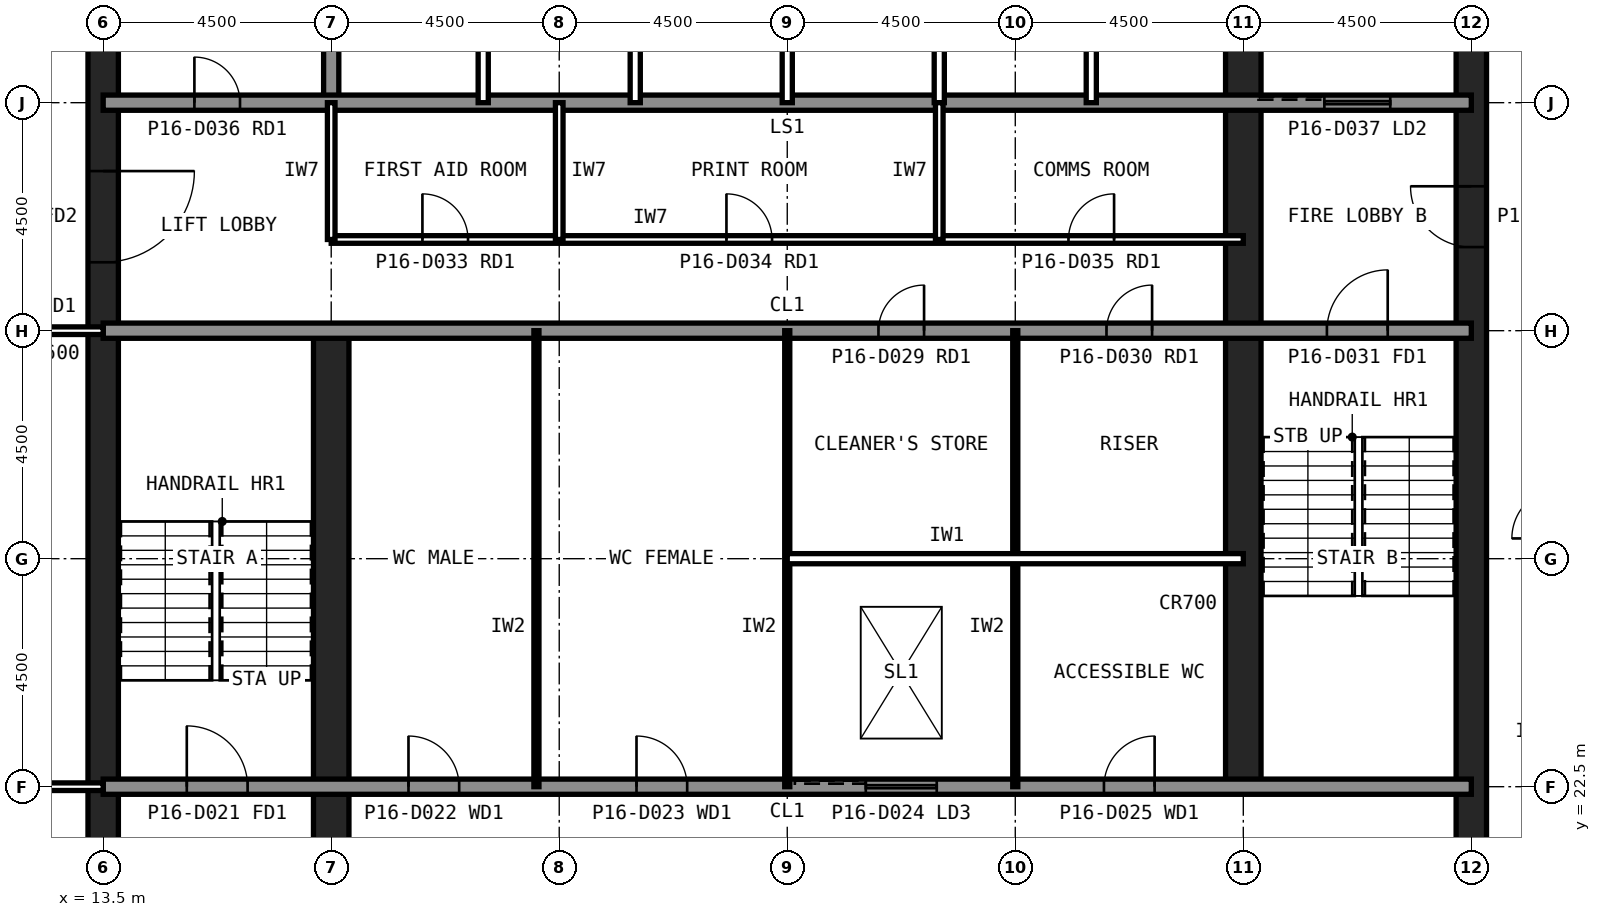
"""IFC4 building model, lengths in metres.
Left out: names, types, materials, properties, quantities, classifications, styles, units other than length and angle.
Written with IfcOpenShell. Run it as: python <this file> out.ifc"""

import sys

from ifc_helpers import new_model, si_unit, direction, frame, frame_2d, origin, place, context, subcontext, project, spatial, rectangle, extrude, element, fill, save


model = new_model("IFC4")
c1 = context("Model", 3, precision=1e-05, world=origin(), true_north=direction((0.0, 1.0)))
c2 = subcontext(c1, "Body", "Model", "MODEL_VIEW")
j1 = project(units=[si_unit("LENGTHUNIT", "METRE"), si_unit("PLANEANGLEUNIT", "RADIAN")], contexts=[c1])
p1 = place(None, origin())
s1 = spatial("IfcSite", under=j1, at=p1, CompositionType="ELEMENT")
p2 = place(p1, origin())
s2 = spatial("IfcBuilding", under=s1, at=p2, CompositionType="ELEMENT")
p3 = place(p2, frame((0.0, 0.0, 71.0)))
s3 = spatial("IfcBuildingStorey", under=s2, at=p3, CompositionType="ELEMENT", Elevation=71.0)
p4 = place(p3, frame((40.5, 13.5, 0.0), z_axis=(0.0, 0.0, 1.0), x_axis=(0.0, 1.0, 0.0)))
e1 = element("IfcWall", 1, at=p4, inside=s3, PredefinedType="SHEAR", context=c2, shape_type="SweptSolid", body=[
    extrude(rectangle(XDim=27.0, YDim=0.6, at=frame_2d((13.5, 0.0))), origin(), (0.0, 0.0, 1.0), 4.2),
])
p5 = place(p4, frame((5.85, 0.0, 0.0)))
e2 = element("IfcOpeningElement", 2, at=p5, cuts=e1, PredefinedType="OPENING", context=c2, shape_type="SweptSolid", body=[
    extrude(rectangle(XDim=1.8, YDim=2.1, at=frame_2d((0.9, 1.05))), frame((0.0, 0.31, 0.0), z_axis=(0.0, -1.0, 0.0), x_axis=(1.0, 0.0, 0.0)), (0.0, 0.0, 1.0), 0.62),
])
p6 = place(p4, frame((19.65, 0.0, 0.0)))
e3 = element("IfcOpeningElement", 3, at=p6, cuts=e1, PredefinedType="OPENING", context=c2, shape_type="SweptSolid", body=[
    extrude(rectangle(XDim=1.2, YDim=2.1, at=frame_2d((0.6, 1.05))), frame((0.0, 0.31, 0.0), z_axis=(0.0, -1.0, 0.0), x_axis=(1.0, 0.0, 0.0)), (0.0, 0.0, 1.0), 0.62),
])
p7 = place(p3, frame((13.5, 40.5, 0.0), z_axis=(0.0, 0.0, 1.0), x_axis=(0.0, -1.0, 0.0)))
e4 = element("IfcWall", 4, at=p7, inside=s3, PredefinedType="SHEAR", context=c2, shape_type="SweptSolid", body=[
    extrude(rectangle(XDim=27.0, YDim=0.6, at=frame_2d((13.5, 0.0))), origin(), (0.0, 0.0, 1.0), 4.2),
])
p8 = place(p7, frame((19.65, 0.0, 0.0)))
e5 = element("IfcOpeningElement", 5, at=p8, cuts=e4, PredefinedType="OPENING", context=c2, shape_type="SweptSolid", body=[
    extrude(rectangle(XDim=1.2, YDim=2.1, at=frame_2d((0.6, 1.05))), frame((0.0, 0.31, 0.0), z_axis=(0.0, -1.0, 0.0), x_axis=(1.0, 0.0, 0.0)), (0.0, 0.0, 1.0), 0.62),
])
p9 = place(p7, frame((5.85, 0.0, 0.0)))
e6 = element("IfcOpeningElement", 6, at=p9, cuts=e4, PredefinedType="OPENING", context=c2, shape_type="SweptSolid", body=[
    extrude(rectangle(XDim=1.8, YDim=2.1, at=frame_2d((0.9, 1.05))), frame((0.0, 0.31, 0.0), z_axis=(0.0, -1.0, 0.0), x_axis=(1.0, 0.0, 0.0)), (0.0, 0.0, 1.0), 0.62),
])
p10 = place(p3, frame((18.0, 13.5, 0.0), z_axis=(0.0, 0.0, 1.0), x_axis=(0.0, 1.0, 0.0)))
e7 = element("IfcWall", 7, at=p10, inside=s3, PredefinedType="SHEAR", context=c2, shape_type="SweptSolid", body=[
    extrude(rectangle(XDim=18.0, YDim=0.7, at=frame_2d((9.0, 0.0))), origin(), (0.0, 0.0, 1.0), 4.2),
])
p11 = place(p3, frame((18.0, 36.0, 0.0), z_axis=(0.0, 0.0, 1.0), x_axis=(0.0, 1.0, 0.0)))
e8 = element("IfcWall", 8, at=p11, inside=s3, PredefinedType="SOLIDWALL", context=c2, shape_type="SweptSolid", body=[
    extrude(rectangle(XDim=4.5, YDim=0.3, at=frame_2d((2.25, 0.0))), origin(), (0.0, 0.0, 1.0), 4.04),
])
p12 = place(p3, frame((36.0, 22.5, 0.0), z_axis=(0.0, 0.0, 1.0), x_axis=(0.0, 1.0, 0.0)))
e9 = element("IfcWall", 9, at=p12, inside=s3, PredefinedType="SHEAR", context=c2, shape_type="SweptSolid", body=[
    extrude(rectangle(XDim=18.0, YDim=0.7, at=frame_2d((9.0, 0.0))), origin(), (0.0, 0.0, 1.0), 4.2),
])
p13 = place(p3, frame((13.5, 36.0, 0.0), z_axis=(0.0, 0.0, 1.0), x_axis=(1.0, 0.0, 0.0)))
e10 = element("IfcWall", 10, at=p13, inside=s3, PredefinedType="SOLIDWALL", context=c2, shape_type="SweptSolid", body=[
    extrude(rectangle(XDim=27.0, YDim=0.3, at=frame_2d((13.5, 0.0))), origin(), (0.0, 0.0, 1.0), 4.04),
])
p14 = place(p13, frame((1.8, 0.0, 0.0)))
e11 = element("IfcOpeningElement", 11, at=p14, cuts=e10, PredefinedType="OPENING", context=c2, shape_type="SweptSolid", body=[
    extrude(rectangle(XDim=0.9, YDim=2.1, at=frame_2d((0.45, 1.05))), frame((0.0, 0.16, 0.0), z_axis=(0.0, -1.0, 0.0), x_axis=(1.0, 0.0, 0.0)), (0.0, 0.0, 1.0), 0.32),
])
p15 = place(p13, frame((24.1, 0.0, 0.0)))
e12 = element("IfcOpeningElement", 12, at=p15, cuts=e10, PredefinedType="OPENING", context=c2, shape_type="SweptSolid", body=[
    extrude(rectangle(XDim=1.3, YDim=2.2, at=frame_2d((0.65, 1.1))), frame((0.0, 0.16, 0.0), z_axis=(0.0, -1.0, 0.0), x_axis=(1.0, 0.0, 0.0)), (0.0, 0.0, 1.0), 0.32),
])
p16 = place(p3, frame((13.5, 22.5, 0.0), z_axis=(0.0, 0.0, 1.0), x_axis=(1.0, 0.0, 0.0)))
e13 = element("IfcWall", 13, at=p16, inside=s3, PredefinedType="SOLIDWALL", context=c2, shape_type="SweptSolid", body=[
    extrude(rectangle(XDim=27.0, YDim=0.3, at=frame_2d((13.5, 0.0))), origin(), (0.0, 0.0, 1.0), 4.04),
])
p17 = place(p16, frame((1.65, 0.0, 0.0)))
e14 = element("IfcOpeningElement", 14, at=p17, cuts=e13, PredefinedType="OPENING", context=c2, shape_type="SweptSolid", body=[
    extrude(rectangle(XDim=1.2, YDim=2.1, at=frame_2d((0.6, 1.05))), frame((0.0, 0.16, 0.0), z_axis=(0.0, -1.0, 0.0), x_axis=(1.0, 0.0, 0.0)), (0.0, 0.0, 1.0), 0.32),
])
p18 = place(p16, frame((6.025, 0.0, 0.0)))
e15 = element("IfcOpeningElement", 15, at=p18, cuts=e13, PredefinedType="OPENING", context=c2, shape_type="SweptSolid", body=[
    extrude(rectangle(XDim=1.0, YDim=2.1, at=frame_2d((0.5, 1.05))), frame((0.0, 0.16, 0.0), z_axis=(0.0, -1.0, 0.0), x_axis=(1.0, 0.0, 0.0)), (0.0, 0.0, 1.0), 0.32),
])
p19 = place(p16, frame((10.525, 0.0, 0.0)))
e16 = element("IfcOpeningElement", 16, at=p19, cuts=e13, PredefinedType="OPENING", context=c2, shape_type="SweptSolid", body=[
    extrude(rectangle(XDim=1.0, YDim=2.1, at=frame_2d((0.5, 1.05))), frame((0.0, 0.16, 0.0), z_axis=(0.0, -1.0, 0.0), x_axis=(1.0, 0.0, 0.0)), (0.0, 0.0, 1.0), 0.32),
])
p20 = place(p16, frame((19.75, 0.0, 0.0)))
e17 = element("IfcOpeningElement", 17, at=p20, cuts=e13, PredefinedType="OPENING", context=c2, shape_type="SweptSolid", body=[
    extrude(rectangle(XDim=1.0, YDim=2.1, at=frame_2d((0.5, 1.05))), frame((0.0, 0.16, 0.0), z_axis=(0.0, -1.0, 0.0), x_axis=(1.0, 0.0, 0.0)), (0.0, 0.0, 1.0), 0.32),
])
p21 = place(p16, frame((15.05, 0.0, 0.0)))
e18 = element("IfcOpeningElement", 18, at=p21, cuts=e13, PredefinedType="OPENING", context=c2, shape_type="SweptSolid", body=[
    extrude(rectangle(XDim=1.4, YDim=2.4, at=frame_2d((0.7, 1.2))), frame((0.0, 0.16, 0.0), z_axis=(0.0, -1.0, 0.0), x_axis=(1.0, 0.0, 0.0)), (0.0, 0.0, 1.0), 0.32),
])
p22 = place(p3, frame((13.5, 31.5, 0.0), z_axis=(0.0, 0.0, 1.0), x_axis=(1.0, 0.0, 0.0)))
e19 = element("IfcWall", 19, at=p22, inside=s3, PredefinedType="SOLIDWALL", context=c2, shape_type="SweptSolid", body=[
    extrude(rectangle(XDim=27.0, YDim=0.3, at=frame_2d((13.5, 0.0))), origin(), (0.0, 0.0, 1.0), 4.04),
])
p23 = place(p22, frame((24.15, 0.0, 0.0)))
e20 = element("IfcOpeningElement", 20, at=p23, cuts=e19, PredefinedType="OPENING", context=c2, shape_type="SweptSolid", body=[
    extrude(rectangle(XDim=1.2, YDim=2.1, at=frame_2d((0.6, 1.05))), frame((0.0, 0.16, 0.0), z_axis=(0.0, -1.0, 0.0), x_axis=(1.0, 0.0, 0.0)), (0.0, 0.0, 1.0), 0.32),
])
p24 = place(p22, frame((15.3, 0.0, 0.0)))
e21 = element("IfcOpeningElement", 21, at=p24, cuts=e19, PredefinedType="OPENING", context=c2, shape_type="SweptSolid", body=[
    extrude(rectangle(XDim=0.9, YDim=2.1, at=frame_2d((0.45, 1.05))), frame((0.0, 0.16, 0.0), z_axis=(0.0, -1.0, 0.0), x_axis=(1.0, 0.0, 0.0)), (0.0, 0.0, 1.0), 0.32),
])
p25 = place(p22, frame((19.8, 0.0, 0.0)))
e22 = element("IfcOpeningElement", 22, at=p25, cuts=e19, PredefinedType="OPENING", context=c2, shape_type="SweptSolid", body=[
    extrude(rectangle(XDim=0.9, YDim=2.1, at=frame_2d((0.45, 1.05))), frame((0.0, 0.16, 0.0), z_axis=(0.0, -1.0, 0.0), x_axis=(1.0, 0.0, 0.0)), (0.0, 0.0, 1.0), 0.32),
])
for number, where, z_axis, x_axis in (
    (23, (21.0, 36.0, 0.0), (0.0, 0.0, 1.0), (0.0, 1.0, 0.0)),
    (24, (24.0, 36.0, 0.0), (0.0, 0.0, 1.0), (0.0, 1.0, 0.0)),
    (25, (27.0, 36.0, 0.0), (0.0, 0.0, 1.0), (0.0, 1.0, 0.0)),
    (26, (30.0, 36.0, 0.0), (0.0, 0.0, 1.0), (0.0, 1.0, 0.0)),
    (27, (33.0, 36.0, 0.0), (0.0, 0.0, 1.0), (0.0, 1.0, 0.0)),
):
    element("IfcWall", number, at=place(p3, frame(where, z_axis=z_axis, x_axis=x_axis)), inside=s3, PredefinedType="PARTITIONING", context=c2, shape_type="SweptSolid", body=[
        extrude(rectangle(XDim=4.5, YDim=0.2, at=frame_2d((2.25, 0.0))), origin(), (0.0, 0.0, 1.0), 4.04),
    ])
for number, where, z_axis, x_axis in (
    (28, (22.05, 22.5, 0.0), (0.0, 0.0, 1.0), (0.0, 1.0, 0.0)),
    (29, (27.0, 22.5, 0.0), (0.0, 0.0, 1.0), (0.0, 1.0, 0.0)),
    (30, (31.5, 22.5, 0.0), (0.0, 0.0, 1.0), (0.0, 1.0, 0.0)),
):
    element("IfcWall", number, at=place(p3, frame(where, z_axis=z_axis, x_axis=x_axis)), inside=s3, PredefinedType="PLUMBINGWALL", context=c2, shape_type="SweptSolid", body=[
        extrude(rectangle(XDim=9.0, YDim=0.1, at=frame_2d((4.5, 0.0))), origin(), (0.0, 0.0, 1.0), 4.04),
    ])
p26 = place(p3, frame((27.0, 27.0, 0.0), z_axis=(0.0, 0.0, 1.0), x_axis=(1.0, 0.0, 0.0)))
e31 = element("IfcWall", 31, at=p26, inside=s3, PredefinedType="PARTITIONING", context=c2, shape_type="SweptSolid", body=[
    extrude(rectangle(XDim=9.0, YDim=0.2, at=frame_2d((4.5, 0.0))), origin(), (0.0, 0.0, 1.0), 4.04),
])
p27 = place(p3, frame((18.0, 33.3, 0.0), z_axis=(0.0, 0.0, 1.0), x_axis=(1.0, 0.0, 0.0)))
e32 = element("IfcWall", 32, at=p27, inside=s3, PredefinedType="PARTITIONING", context=c2, shape_type="SweptSolid", body=[
    extrude(rectangle(XDim=18.0, YDim=0.15, at=frame_2d((9.0, 0.0))), origin(), (0.0, 0.0, 1.0), 4.04),
])
p28 = place(p27, frame((1.8, 0.0, 0.0)))
e33 = element("IfcOpeningElement", 33, at=p28, cuts=e32, PredefinedType="OPENING", context=c2, shape_type="SweptSolid", body=[
    extrude(rectangle(XDim=0.9, YDim=2.1, at=frame_2d((0.45, 1.05))), frame((0.0, 0.085, 0.0), z_axis=(0.0, -1.0, 0.0), x_axis=(1.0, 0.0, 0.0)), (0.0, 0.0, 1.0), 0.17),
])
p29 = place(p27, frame((7.8, 0.0, 0.0)))
e34 = element("IfcOpeningElement", 34, at=p29, cuts=e32, PredefinedType="OPENING", context=c2, shape_type="SweptSolid", body=[
    extrude(rectangle(XDim=0.9, YDim=2.1, at=frame_2d((0.45, 1.05))), frame((0.0, 0.085, 0.0), z_axis=(0.0, -1.0, 0.0), x_axis=(1.0, 0.0, 0.0)), (0.0, 0.0, 1.0), 0.17),
])
p30 = place(p27, frame((14.55, 0.0, 0.0)))
e35 = element("IfcOpeningElement", 35, at=p30, cuts=e32, PredefinedType="OPENING", context=c2, shape_type="SweptSolid", body=[
    extrude(rectangle(XDim=0.9, YDim=2.1, at=frame_2d((0.45, 1.05))), frame((0.0, 0.085, 0.0), z_axis=(0.0, -1.0, 0.0), x_axis=(1.0, 0.0, 0.0)), (0.0, 0.0, 1.0), 0.17),
])
for number, where, z_axis, x_axis in (
    (36, (18.0, 33.3, 0.0), (0.0, 0.0, 1.0), (0.0, 1.0, 0.0)),
    (37, (22.5, 33.3, 0.0), (0.0, 0.0, 1.0), (0.0, 1.0, 0.0)),
    (38, (30.0, 33.3, 0.0), (0.0, 0.0, 1.0), (0.0, 1.0, 0.0)),
):
    element("IfcWall", number, at=place(p3, frame(where, z_axis=z_axis, x_axis=x_axis)), inside=s3, PredefinedType="PARTITIONING", context=c2, shape_type="SweptSolid", body=[
        extrude(rectangle(XDim=2.7, YDim=0.15, at=frame_2d((1.35, 0.0))), origin(), (0.0, 0.0, 1.0), 4.04),
    ])
p31 = place(p3, frame((9.9, 22.5, 0.0), z_axis=(0.0, 0.0, 1.0), x_axis=(1.0, 0.0, 0.0)))
e39 = element("IfcWall", 39, at=p31, inside=s3, PredefinedType="PARTITIONING", context=c2, shape_type="SweptSolid", body=[
    extrude(rectangle(XDim=3.6, YDim=0.15, at=frame_2d((1.8, 0.0))), origin(), (0.0, 0.0, 1.0), 3.189),
])
p32 = place(p3, frame((13.5, 31.5, 0.0), z_axis=(0.0, 0.0, 1.0), x_axis=(-1.0, 0.0, 0.0)))
e40 = element("IfcWall", 40, at=p32, inside=s3, PredefinedType="PARTITIONING", context=c2, shape_type="SweptSolid", body=[
    extrude(rectangle(XDim=3.6, YDim=0.15, at=frame_2d((1.8, 0.0))), origin(), (0.0, 0.0, 1.0), 3.189),
])
p33 = place(p32, frame((1.3, 0.0, 0.0)))
e41 = element("IfcOpeningElement", 41, at=p33, cuts=e40, PredefinedType="OPENING", context=c2, shape_type="SweptSolid", body=[
    extrude(rectangle(XDim=1.0, YDim=2.1, at=frame_2d((0.5, 1.05))), frame((0.0, 0.085, 0.0), z_axis=(0.0, -1.0, 0.0), x_axis=(1.0, 0.0, 0.0)), (0.0, 0.0, 1.0), 0.17),
])
p34 = place(p9, origin())
e42 = element("IfcDoor", 42, at=p34, inside=s3, OperationType="SINGLE_SWING_LEFT", PredefinedType="DOOR", context=c2, shape_type="SweptSolid", body=[
    extrude(rectangle(XDim=1.8, YDim=2.1, at=frame_2d((0.9, 1.05))), frame((0.0, 0.025, 0.0), z_axis=(0.0, -1.0, 0.0), x_axis=(1.0, 0.0, 0.0)), (0.0, 0.0, 1.0), 0.05),
])
fill(e6, e42)
p35 = place(p6, origin())
e43 = element("IfcDoor", 43, at=p35, inside=s3, OperationType="SINGLE_SWING_RIGHT", PredefinedType="DOOR", context=c2, shape_type="SweptSolid", body=[
    extrude(rectangle(XDim=1.2, YDim=2.1, at=frame_2d((0.6, 1.05))), frame((0.0, 0.025, 0.0), z_axis=(0.0, -1.0, 0.0), x_axis=(1.0, 0.0, 0.0)), (0.0, 0.0, 1.0), 0.05),
])
fill(e3, e43)
p36 = place(p17, origin())
e44 = element("IfcDoor", 44, at=p36, inside=s3, OperationType="SINGLE_SWING_LEFT", PredefinedType="DOOR", context=c2, shape_type="SweptSolid", body=[
    extrude(rectangle(XDim=1.2, YDim=2.1, at=frame_2d((0.6, 1.05))), frame((0.0, 0.025, 0.0), z_axis=(0.0, -1.0, 0.0), x_axis=(1.0, 0.0, 0.0)), (0.0, 0.0, 1.0), 0.05),
])
fill(e14, e44)
p37 = place(p23, origin())
e45 = element("IfcDoor", 45, at=p37, inside=s3, OperationType="SINGLE_SWING_RIGHT", PredefinedType="DOOR", context=c2, shape_type="SweptSolid", body=[
    extrude(rectangle(XDim=1.2, YDim=2.1, at=frame_2d((0.6, 1.05))), frame((0.0, 0.025, 0.0), z_axis=(0.0, -1.0, 0.0), x_axis=(1.0, 0.0, 0.0)), (0.0, 0.0, 1.0), 0.05),
])
fill(e20, e45)
p38 = place(p18, origin())
e46 = element("IfcDoor", 46, at=p38, inside=s3, OperationType="SINGLE_SWING_LEFT", PredefinedType="DOOR", context=c2, shape_type="SweptSolid", body=[
    extrude(rectangle(XDim=1.0, YDim=2.1, at=frame_2d((0.5, 1.05))), frame((0.0, 0.025, 0.0), z_axis=(0.0, -1.0, 0.0), x_axis=(1.0, 0.0, 0.0)), (0.0, 0.0, 1.0), 0.05),
])
fill(e15, e46)
p39 = place(p19, origin())
e47 = element("IfcDoor", 47, at=p39, inside=s3, OperationType="SINGLE_SWING_LEFT", PredefinedType="DOOR", context=c2, shape_type="SweptSolid", body=[
    extrude(rectangle(XDim=1.0, YDim=2.1, at=frame_2d((0.5, 1.05))), frame((0.0, 0.025, 0.0), z_axis=(0.0, -1.0, 0.0), x_axis=(1.0, 0.0, 0.0)), (0.0, 0.0, 1.0), 0.05),
])
fill(e16, e47)
p40 = place(p20, origin())
e48 = element("IfcDoor", 48, at=p40, inside=s3, OperationType="SINGLE_SWING_RIGHT", PredefinedType="DOOR", context=c2, shape_type="SweptSolid", body=[
    extrude(rectangle(XDim=1.0, YDim=2.1, at=frame_2d((0.5, 1.05))), frame((0.0, 0.025, 0.0), z_axis=(0.0, -1.0, 0.0), x_axis=(1.0, 0.0, 0.0)), (0.0, 0.0, 1.0), 0.05),
])
fill(e17, e48)
p41 = place(p24, origin())
e49 = element("IfcDoor", 49, at=p41, inside=s3, OperationType="SINGLE_SWING_RIGHT", PredefinedType="DOOR", context=c2, shape_type="SweptSolid", body=[
    extrude(rectangle(XDim=0.9, YDim=2.1, at=frame_2d((0.45, 1.05))), frame((0.0, 0.025, 0.0), z_axis=(0.0, -1.0, 0.0), x_axis=(1.0, 0.0, 0.0)), (0.0, 0.0, 1.0), 0.05),
])
fill(e21, e49)
p42 = place(p25, origin())
e50 = element("IfcDoor", 50, at=p42, inside=s3, OperationType="SINGLE_SWING_RIGHT", PredefinedType="DOOR", context=c2, shape_type="SweptSolid", body=[
    extrude(rectangle(XDim=0.9, YDim=2.1, at=frame_2d((0.45, 1.05))), frame((0.0, 0.025, 0.0), z_axis=(0.0, -1.0, 0.0), x_axis=(1.0, 0.0, 0.0)), (0.0, 0.0, 1.0), 0.05),
])
fill(e22, e50)
p43 = place(p14, origin())
e51 = element("IfcDoor", 51, at=p43, inside=s3, OperationType="SINGLE_SWING_LEFT", PredefinedType="DOOR", context=c2, shape_type="SweptSolid", body=[
    extrude(rectangle(XDim=0.9, YDim=2.1, at=frame_2d((0.45, 1.05))), frame((0.0, 0.025, 0.0), z_axis=(0.0, -1.0, 0.0), x_axis=(1.0, 0.0, 0.0)), (0.0, 0.0, 1.0), 0.05),
])
fill(e11, e51)
p44 = place(p28, origin())
e52 = element("IfcDoor", 52, at=p44, inside=s3, OperationType="SINGLE_SWING_LEFT", PredefinedType="DOOR", context=c2, shape_type="SweptSolid", body=[
    extrude(rectangle(XDim=0.9, YDim=2.1, at=frame_2d((0.45, 1.05))), frame((0.0, 0.025, 0.0), z_axis=(0.0, -1.0, 0.0), x_axis=(1.0, 0.0, 0.0)), (0.0, 0.0, 1.0), 0.05),
])
fill(e33, e52)
p45 = place(p29, origin())
e53 = element("IfcDoor", 53, at=p45, inside=s3, OperationType="SINGLE_SWING_LEFT", PredefinedType="DOOR", context=c2, shape_type="SweptSolid", body=[
    extrude(rectangle(XDim=0.9, YDim=2.1, at=frame_2d((0.45, 1.05))), frame((0.0, 0.025, 0.0), z_axis=(0.0, -1.0, 0.0), x_axis=(1.0, 0.0, 0.0)), (0.0, 0.0, 1.0), 0.05),
])
fill(e34, e53)
p46 = place(p30, origin())
e54 = element("IfcDoor", 54, at=p46, inside=s3, OperationType="SINGLE_SWING_RIGHT", PredefinedType="DOOR", context=c2, shape_type="SweptSolid", body=[
    extrude(rectangle(XDim=0.9, YDim=2.1, at=frame_2d((0.45, 1.05))), frame((0.0, 0.025, 0.0), z_axis=(0.0, -1.0, 0.0), x_axis=(1.0, 0.0, 0.0)), (0.0, 0.0, 1.0), 0.05),
])
fill(e35, e54)
p47 = place(p15, origin())
e55 = element("IfcDoor", 55, at=p47, inside=s3, OperationType="SLIDING_TO_LEFT", PredefinedType="DOOR", context=c2, shape_type="SweptSolid", body=[
    extrude(rectangle(XDim=1.3, YDim=2.2, at=frame_2d((0.65, 1.1))), frame((0.0, 0.025, 0.0), z_axis=(0.0, -1.0, 0.0), x_axis=(1.0, 0.0, 0.0)), (0.0, 0.0, 1.0), 0.05),
])
fill(e12, e55)
p48 = place(p21, origin())
e56 = element("IfcDoor", 56, at=p48, inside=s3, OperationType="SLIDING_TO_LEFT", PredefinedType="DOOR", context=c2, shape_type="SweptSolid", body=[
    extrude(rectangle(XDim=1.4, YDim=2.4, at=frame_2d((0.7, 1.2))), frame((0.0, 0.025, 0.0), z_axis=(0.0, -1.0, 0.0), x_axis=(1.0, 0.0, 0.0)), (0.0, 0.0, 1.0), 0.05),
])
fill(e18, e56)
save(model, sys.argv[1])
